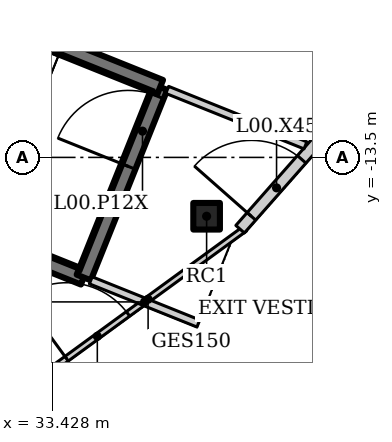
"""IFC4 building model, lengths in metres.
Left out: names, types, materials, properties, quantities, classifications, styles, units other than length and angle.
Written with IfcOpenShell. Run it as: python <this file> out.ifc"""

import sys

from ifc_helpers import new_model, si_unit, direction, frame, frame_2d, origin, origin_2d, place, context, subcontext, project, spatial, rectangle, hollow_rectangle, extrude, element, fill, save


model = new_model("IFC4")
c1 = context("Model", 3, precision=1e-05, world=origin(), true_north=direction((0.0, 1.0)))
c2 = subcontext(c1, "Body", "Model", "MODEL_VIEW")
j1 = project(units=[si_unit("LENGTHUNIT", "METRE"), si_unit("PLANEANGLEUNIT", "RADIAN")], contexts=[c1])
p1 = place(None, origin())
s1 = spatial("IfcSite", under=j1, at=p1, CompositionType="ELEMENT")
p2 = place(p1, origin())
s2 = spatial("IfcBuilding", under=s1, at=p2, CompositionType="ELEMENT")
p3 = place(p2, origin())
s3 = spatial("IfcBuildingStorey", under=s2, at=p3, CompositionType="ELEMENT", Elevation=0.0)
p4 = place(p3, frame((37.487, -15.049, 0.0), z_axis=(0.0, 0.0, 1.0), x_axis=(1.0, 0.0, 0.0)))
e1 = element("IfcColumn", 1, at=p4, inside=s3, PredefinedType="COLUMN", context=c2, shape_type="SweptSolid", body=[
    extrude(hollow_rectangle(XDim=0.7, YDim=0.7, WallThickness=0.04, at=origin_2d()), origin(), (0.0, 0.0, 1.0), 6.5),
])
p5 = place(p3, frame((33.399, -19.092, 0.0), z_axis=(0.0, 0.0, 1.0), x_axis=(0.807916937434, 0.589296378919, 0.0)))
e2 = element("IfcWall", 2, at=p5, inside=s3, PredefinedType="ELEMENTEDWALL", context=c2, shape_type="SweptSolid", body=[
    extrude(rectangle(XDim=6.308, YDim=0.15, at=frame_2d((3.154, 0.0))), origin(), (0.0, 0.0, 1.0), 6.3),
])
p6 = place(p5, frame((0.5, 0.0, 0.0)))
e3 = element("IfcOpeningElement", 3, at=p6, cuts=e2, PredefinedType="OPENING", context=c2, shape_type="SweptSolid", body=[
    extrude(rectangle(XDim=2.0, YDim=2.4, at=frame_2d((1.0, 1.2))), frame((0.0, 0.085, 0.0), z_axis=(0.0, -1.0, 0.0), x_axis=(1.0, 0.0, 0.0)), (0.0, 0.0, 1.0), 0.17),
])
p7 = place(p3, frame((38.368, -15.389, 0.0), z_axis=(0.0, 0.0, 1.0), x_axis=(0.661196672464, 0.75021261008, 0.0)))
e4 = element("IfcWall", 4, at=p7, inside=s3, PredefinedType="SOLIDWALL", context=c2, shape_type="SweptSolid", body=[
    extrude(rectangle(XDim=6.481, YDim=0.3, at=frame_2d((3.24, 0.0))), origin(), (0.0, 0.0, 1.0), 6.3),
])
p8 = place(p7, frame((0.45, 0.0, 0.0)))
e5 = element("IfcOpeningElement", 5, at=p8, cuts=e4, PredefinedType="OPENING", context=c2, shape_type="SweptSolid", body=[
    extrude(rectangle(XDim=2.0, YDim=2.1, at=frame_2d((1.0, 1.05))), frame((0.0, 0.16, 0.0), z_axis=(0.0, -1.0, 0.0), x_axis=(1.0, 0.0, 0.0)), (0.0, 0.0, 1.0), 0.32),
])
p9 = place(p3, frame((34.439, -16.735, 0.0), z_axis=(0.0, 0.0, 1.0), x_axis=(0.928012232862, -0.372549722396, 0.0)))
e6 = element("IfcWall", 6, at=p9, inside=s3, PredefinedType="SOLIDWALL", context=c2, shape_type="SweptSolid", body=[
    extrude(rectangle(XDim=3.05, YDim=0.2, at=frame_2d((1.525, 0.0))), origin(), (0.0, 0.0, 1.0), 6.3),
])
p10 = place(p3, frame((36.451, -11.723, 0.0), z_axis=(0.0, 0.0, 1.0), x_axis=(0.928024835595, -0.372518327762, 0.0)))
e7 = element("IfcWall", 7, at=p10, inside=s3, PredefinedType="SOLIDWALL", context=c2, shape_type="SweptSolid", body=[
    extrude(rectangle(XDim=3.918, YDim=0.2, at=frame_2d((1.959, 0.0))), origin(), (0.0, 0.0, 1.0), 6.3),
])
p11 = place(p3, frame((26.087, -13.382, 0.0), z_axis=(0.0, 0.0, 1.0), x_axis=(0.92801678004, -0.372538395288, 0.0)))
e8 = element("IfcWall", 8, at=p11, inside=s3, PredefinedType="SHEAR", context=c2, shape_type="SweptSolid", body=[
    extrude(rectangle(XDim=8.8, YDim=0.4, at=frame_2d((4.4, 0.0))), origin(), (0.0, 0.0, 1.0), 6.5),
])
p12 = place(p3, frame((34.253, -16.66, 0.0), z_axis=(0.0, 0.0, 1.0), x_axis=(0.372544066459, 0.928014503414, 0.0)))
e9 = element("IfcWall", 9, at=p12, inside=s3, PredefinedType="SHEAR", context=c2, shape_type="SweptSolid", body=[
    extrude(rectangle(XDim=5.4, YDim=0.4, at=frame_2d((2.7, 0.0))), origin(), (0.0, 0.0, 1.0), 6.5),
])
p13 = place(p12, frame((3.15, 0.0, 0.0)))
e10 = element("IfcOpeningElement", 10, at=p13, cuts=e9, PredefinedType="OPENING", context=c2, shape_type="SweptSolid", body=[
    extrude(rectangle(XDim=2.0, YDim=2.1, at=frame_2d((1.0, 1.05))), frame((0.0, 0.21, 0.0), z_axis=(0.0, -1.0, 0.0), x_axis=(1.0, 0.0, 0.0)), (0.0, 0.0, 1.0), 0.42),
])
p14 = place(p3, frame((36.265, -11.649, 0.0), z_axis=(0.0, 0.0, 1.0), x_axis=(-0.928007188331, 0.372562287955, 0.0)))
e11 = element("IfcWall", 11, at=p14, inside=s3, PredefinedType="SHEAR", context=c2, shape_type="SweptSolid", body=[
    extrude(rectangle(XDim=8.8, YDim=0.4, at=frame_2d((4.4, 0.0))), origin(), (0.0, 0.0, 1.0), 6.5),
])
p15 = place(p6, origin())
e12 = element("IfcDoor", 12, at=p15, inside=s3, OperationType="DOUBLE_DOOR_DOUBLE_SWING", PredefinedType="DOOR", context=c2, shape_type="SweptSolid", body=[
    extrude(rectangle(XDim=2.0, YDim=2.4, at=frame_2d((1.0, 1.2))), frame((0.0, 0.025, 0.0), z_axis=(0.0, -1.0, 0.0), x_axis=(1.0, 0.0, 0.0)), (0.0, 0.0, 1.0), 0.05),
])
fill(e3, e12)
p16 = place(p8, origin())
e13 = element("IfcDoor", 13, at=p16, inside=s3, OperationType="DOUBLE_DOOR_DOUBLE_SWING", PredefinedType="DOOR", context=c2, shape_type="SweptSolid", body=[
    extrude(rectangle(XDim=2.0, YDim=2.1, at=frame_2d((1.0, 1.05))), frame((0.0, 0.025, 0.0), z_axis=(0.0, -1.0, 0.0), x_axis=(1.0, 0.0, 0.0)), (0.0, 0.0, 1.0), 0.05),
])
fill(e5, e13)
p17 = place(p13, origin())
e14 = element("IfcDoor", 14, at=p17, inside=s3, OperationType="DOUBLE_DOOR_DOUBLE_SWING", PredefinedType="DOOR", context=c2, shape_type="SweptSolid", body=[
    extrude(rectangle(XDim=2.0, YDim=2.1, at=frame_2d((1.0, 1.05))), frame((0.0, 0.025, 0.0), z_axis=(0.0, -1.0, 0.0), x_axis=(1.0, 0.0, 0.0)), (0.0, 0.0, 1.0), 0.05),
])
fill(e10, e14)
save(model, sys.argv[1])
